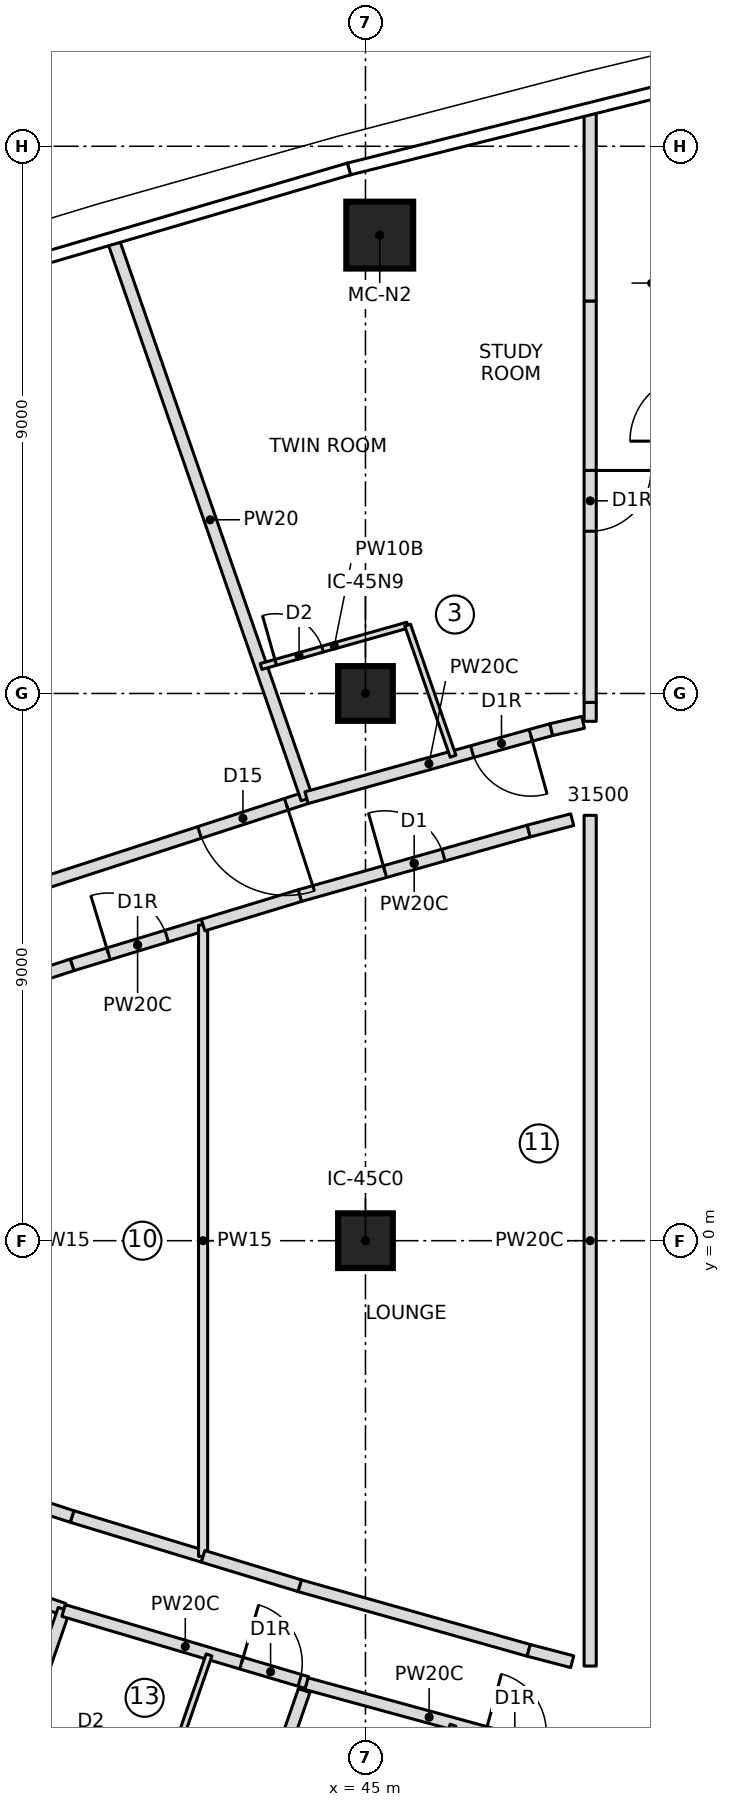
"""IFC4 building model, lengths in metres.
Left out: names, types, materials, properties, quantities, classifications, styles, units other than length and angle.
Written with IfcOpenShell. Run it as: python <this file> out.ifc"""

import sys

from ifc_helpers import new_model, si_unit, direction, frame, frame_2d, origin, origin_2d, place, context, subcontext, project, spatial, rectangle, extrude, element, fill, save


model = new_model("IFC4")
c1 = context("Model", 3, precision=1e-05, world=origin(), true_north=direction((0.0, 1.0)))
c2 = subcontext(c1, "Body", "Model", "MODEL_VIEW")
j1 = project(units=[si_unit("LENGTHUNIT", "METRE"), si_unit("PLANEANGLEUNIT", "RADIAN")], contexts=[c1])
p1 = place(None, origin())
s1 = spatial("IfcSite", under=j1, at=p1, CompositionType="ELEMENT")
p2 = place(p1, origin())
s2 = spatial("IfcBuilding", under=s1, at=p2, CompositionType="ELEMENT")
p3 = place(p2, frame((0.0, 0.0, 271.45)))
s3 = spatial("IfcBuildingStorey", under=s2, at=p3, CompositionType="ELEMENT", Elevation=271.45)
p4 = place(p3, frame((45.235, 16.539, 0.0), z_axis=(0.0, 0.0, 1.0), x_axis=(1.0, 0.0, 0.0)))
e1 = element("IfcColumn", 1, at=p4, inside=s3, PredefinedType="COLUMN", context=c2, shape_type="SweptSolid", body=[
    extrude(rectangle(XDim=1.1, YDim=1.1, at=origin_2d()), origin(), (0.0, 0.0, 1.0), 3.55),
])
for number, where, z_axis, x_axis in (
    (2, (45.0, 0.0, 0.0), (0.0, 0.0, 1.0), (1.0, 0.0, 0.0)),
    (3, (45.0, 9.0, 0.0), (0.0, 0.0, 1.0), (1.0, 0.0, 0.0)),
):
    element("IfcColumn", number, at=place(p3, frame(where, z_axis=z_axis, x_axis=x_axis)), inside=s3, PredefinedType="COLUMN", context=c2, shape_type="SweptSolid", body=[
        extrude(rectangle(XDim=0.9, YDim=0.9, at=origin_2d()), origin(), (0.0, 0.0, 1.0), 3.55),
    ])
p5 = place(p3, frame((44.031, 7.286, 0.0), z_axis=(0.0, 0.0, 1.0), x_axis=(-0.951130603276, -0.308788885019, 0.0)))
e4 = element("IfcWall", 4, at=p5, inside=s3, PredefinedType="PARTITIONING", context=c2, shape_type="SweptSolid", body=[
    extrude(rectangle(XDim=12.521, YDim=0.2, at=frame_2d((6.26, 0.0))), origin(), (0.0, 0.0, 1.0), 3.25),
])
p6 = place(p5, frame((0.35, 0.0, 0.0)))
e5 = element("IfcOpeningElement", 5, at=p6, cuts=e4, PredefinedType="OPENING", context=c2, shape_type="SweptSolid", body=[
    extrude(rectangle(XDim=1.5, YDim=2.1, at=frame_2d((0.75, 1.05))), frame((0.0, 0.11, 0.0), z_axis=(0.0, -1.0, 0.0), x_axis=(1.0, 0.0, 0.0)), (0.0, 0.0, 1.0), 0.22),
])
p7 = place(p3, frame((44.038, 7.267, 0.0), z_axis=(0.0, 0.0, 1.0), x_axis=(-0.327714576096, 0.944776776077, 0.0)))
e6 = element("IfcWall", 6, at=p7, inside=s3, PredefinedType="PARTITIONING", context=c2, shape_type="SweptSolid", body=[
    extrude(rectangle(XDim=9.717, YDim=0.2, at=frame_2d((4.858, 0.0))), origin(), (0.0, 0.0, 1.0), 3.25),
])
p8 = place(p3, frame((48.056, 8.405, 0.0), z_axis=(0.0, 0.0, 1.0), x_axis=(-0.963429942227, -0.267960344866, 0.0)))
e7 = element("IfcWall", 7, at=p8, inside=s3, PredefinedType="PARTITIONING", context=c2, shape_type="SweptSolid", body=[
    extrude(rectangle(XDim=4.177, YDim=0.2, at=frame_2d((2.089, 0.0))), origin(), (0.0, 0.0, 1.0), 3.25),
])
p9 = place(p8, frame((0.35, 0.0, 0.0)))
e8 = element("IfcOpeningElement", 8, at=p9, cuts=e7, PredefinedType="OPENING", context=c2, shape_type="SweptSolid", body=[
    extrude(rectangle(XDim=1.0, YDim=2.1, at=frame_2d((0.5, 1.05))), frame((0.0, 0.11, 0.0), z_axis=(0.0, -1.0, 0.0), x_axis=(1.0, 0.0, 0.0)), (0.0, 0.0, 1.0), 0.22),
])
p10 = place(p3, frame((43.283, 9.444, 0.0), z_axis=(0.0, 0.0, 1.0), x_axis=(0.962409173596, 0.271603723424, 0.0)))
e9 = element("IfcWall", 9, at=p10, inside=s3, PredefinedType="PARTITIONING", context=c2, shape_type="SweptSolid", body=[
    extrude(rectangle(XDim=2.504, YDim=0.1, at=frame_2d((1.252, 0.0))), origin(), (0.0, 0.0, 1.0), 3.25),
])
p11 = place(p10, frame((0.25, 0.0, 0.0)))
e10 = element("IfcOpeningElement", 10, at=p11, cuts=e9, PredefinedType="OPENING", context=c2, shape_type="SweptSolid", body=[
    extrude(rectangle(XDim=0.8, YDim=2.1, at=frame_2d((0.4, 1.05))), frame((0.0, 0.06, 0.0), z_axis=(0.0, -1.0, 0.0), x_axis=(1.0, 0.0, 0.0)), (0.0, 0.0, 1.0), 0.12),
])
p12 = place(p3, frame((45.693, 10.124, 0.0), z_axis=(0.0, 0.0, 1.0), x_axis=(0.327764902685, -0.944759317799, 0.0)))
e11 = element("IfcWall", 11, at=p12, inside=s3, PredefinedType="PARTITIONING", context=c2, shape_type="SweptSolid", body=[
    extrude(rectangle(XDim=2.281, YDim=0.1, at=frame_2d((1.14, 0.0))), origin(), (0.0, 0.0, 1.0), 3.25),
])
p13 = place(p3, frame((26.85, -1.423, 0.0), z_axis=(0.0, 0.0, 1.0), x_axis=(0.943328585164, -0.331860182022, 0.0)))
e12 = element("IfcWall", 12, at=p13, inside=s3, PredefinedType="PARTITIONING", context=c2, shape_type="SweptSolid", body=[
    extrude(rectangle(XDim=13.984, YDim=0.2, at=frame_2d((6.992, 0.0))), origin(), (0.0, 0.0, 1.0), 3.25),
])
p14 = place(p13, frame((3.05, 0.0, 0.0)))
e13 = element("IfcOpeningElement", 13, at=p14, cuts=e12, PredefinedType="OPENING", context=c2, shape_type="SweptSolid", body=[
    extrude(rectangle(XDim=1.5, YDim=2.1, at=frame_2d((0.75, 1.05))), frame((0.0, 0.11, 0.0), z_axis=(0.0, -1.0, 0.0), x_axis=(1.0, 0.0, 0.0)), (0.0, 0.0, 1.0), 0.22),
])
p15 = place(p3, frame((36.861, -15.235, 0.0), z_axis=(0.0, 0.0, 1.0), x_axis=(0.327710853631, 0.944778067279, 0.0)))
e14 = element("IfcWall", 14, at=p15, inside=s3, PredefinedType="PARTITIONING", context=c2, shape_type="SweptSolid", body=[
    extrude(rectangle(XDim=9.707, YDim=0.2, at=frame_2d((4.854, 0.0))), origin(), (0.0, 0.0, 1.0), 3.25),
])
p16 = place(p3, frame((40.035, -6.083, 0.0), z_axis=(0.0, 0.0, 1.0), x_axis=(0.958901312153, -0.283739799027, 0.0)))
e15 = element("IfcWall", 15, at=p16, inside=s3, PredefinedType="PARTITIONING", context=c2, shape_type="SweptSolid", body=[
    extrude(rectangle(XDim=4.174, YDim=0.2, at=frame_2d((2.087, 0.0))), origin(), (0.0, 0.0, 1.0), 3.25),
])
p17 = place(p16, frame((3.05, 0.0, 0.0)))
e16 = element("IfcOpeningElement", 16, at=p17, cuts=e15, PredefinedType="OPENING", context=c2, shape_type="SweptSolid", body=[
    extrude(rectangle(XDim=1.0, YDim=2.1, at=frame_2d((0.5, 1.05))), frame((0.0, 0.11, 0.0), z_axis=(0.0, -1.0, 0.0), x_axis=(1.0, 0.0, 0.0)), (0.0, 0.0, 1.0), 0.22),
])
p18 = place(p3, frame((42.428, -6.813, 0.0), z_axis=(0.0, 0.0, 1.0), x_axis=(-0.327743427431, -0.944766767925, 0.0)))
e17 = element("IfcWall", 17, at=p18, inside=s3, PredefinedType="PARTITIONING", context=c2, shape_type="SweptSolid", body=[
    extrude(rectangle(XDim=2.279, YDim=0.1, at=frame_2d((1.139, 0.0))), origin(), (0.0, 0.0, 1.0), 3.25),
])
p19 = place(p3, frame((40.854, -16.447, 0.0), z_axis=(0.0, 0.0, 1.0), x_axis=(0.327714654767, 0.944776748788, 0.0)))
e18 = element("IfcWall", 18, at=p19, inside=s3, PredefinedType="PARTITIONING", context=c2, shape_type="SweptSolid", body=[
    extrude(rectangle(XDim=9.577, YDim=0.2, at=frame_2d((4.788, 0.0))), origin(), (0.0, 0.0, 1.0), 3.25),
])
p20 = place(p3, frame((44.031, -7.286, 0.0), z_axis=(0.0, 0.0, 1.0), x_axis=(0.964708521199, -0.263320088726, 0.0)))
e19 = element("IfcWall", 19, at=p20, inside=s3, PredefinedType="PARTITIONING", context=c2, shape_type="SweptSolid", body=[
    extrude(rectangle(XDim=4.179, YDim=0.2, at=frame_2d((2.089, 0.0))), origin(), (0.0, 0.0, 1.0), 3.25),
])
p21 = place(p20, frame((3.05, 0.0, 0.0)))
e20 = element("IfcOpeningElement", 20, at=p21, cuts=e19, PredefinedType="OPENING", context=c2, shape_type="SweptSolid", body=[
    extrude(rectangle(XDim=1.0, YDim=2.1, at=frame_2d((0.5, 1.05))), frame((0.0, 0.11, 0.0), z_axis=(0.0, -1.0, 0.0), x_axis=(1.0, 0.0, 0.0)), (0.0, 0.0, 1.0), 0.22),
])
p22 = place(p3, frame((46.44, -7.969, 0.0), z_axis=(0.0, 0.0, 1.0), x_axis=(-0.327764902685, -0.944759317799, 0.0)))
e21 = element("IfcWall", 21, at=p22, inside=s3, PredefinedType="PARTITIONING", context=c2, shape_type="SweptSolid", body=[
    extrude(rectangle(XDim=2.281, YDim=0.1, at=frame_2d((1.14, 0.0))), origin(), (0.0, 0.0, 1.0), 3.25),
])
p23 = place(p3, frame((40.175, 4.536, 0.0), z_axis=(0.0, 0.0, 1.0), x_axis=(0.956739496331, 0.290945933396, 0.0)))
e22 = element("IfcWall", 22, at=p23, inside=s3, PredefinedType="PARTITIONING", context=c2, shape_type="SweptSolid", body=[
    extrude(rectangle(XDim=2.252, YDim=0.2, at=frame_2d((1.126, 0.0))), origin(), (0.0, 0.0, 1.0), 3.25),
])
p24 = place(p23, frame((0.626, 0.0, 0.0)))
e23 = element("IfcOpeningElement", 23, at=p24, cuts=e22, PredefinedType="OPENING", context=c2, shape_type="SweptSolid", body=[
    extrude(rectangle(XDim=1.0, YDim=2.1, at=frame_2d((0.5, 1.05))), frame((0.0, 0.11, 0.0), z_axis=(0.0, -1.0, 0.0), x_axis=(1.0, 0.0, 0.0)), (0.0, 0.0, 1.0), 0.22),
])
p25 = place(p3, frame((42.33, -5.191, 0.0), z_axis=(0.0, 0.0, 1.0), x_axis=(-0.956739496331, 0.290945933396, 0.0)))
e24 = element("IfcWall", 24, at=p25, inside=s3, PredefinedType="PARTITIONING", context=c2, shape_type="SweptSolid", body=[
    extrude(rectangle(XDim=2.252, YDim=0.2, at=frame_2d((1.126, 0.0))), origin(), (0.0, 0.0, 1.0), 3.25),
])
for number, where, z_axis, x_axis in (
    (25, (40.175, -4.536, 0.0), (0.0, 0.0, 1.0), (-0.951, 0.31, 0.0)),
    (26, (39.33, 4.26, 0.0), (0.0, 0.0, 1.0), (0.951, 0.31, 0.0)),
):
    element("IfcWall", number, at=place(p3, frame(where, z_axis=z_axis, x_axis=x_axis)), inside=s3, PredefinedType="PARTITIONING", context=c2, shape_type="SweptSolid", body=[
        extrude(rectangle(XDim=0.889, YDim=0.2, at=frame_2d((0.444, 0.0))), origin(), (0.0, 0.0, 1.0), 3.25),
    ])
p26 = place(p3, frame((42.33, -5.191, 0.0), z_axis=(0.0, 0.0, 1.0), x_axis=(0.0, 1.0, 0.0)))
e27 = element("IfcWall", 27, at=p26, inside=s3, PredefinedType="PARTITIONING", context=c2, shape_type="SweptSolid", body=[
    extrude(rectangle(XDim=10.383, YDim=0.15, at=frame_2d((5.191, 0.0))), origin(), (0.0, 0.0, 1.0), 3.25),
])
p27 = place(p3, frame((43.918, 5.675, 0.0), z_axis=(0.0, 0.0, 1.0), x_axis=(0.962411212211, 0.271596499628, 0.0)))
e28 = element("IfcWall", 28, at=p27, inside=s3, PredefinedType="PARTITIONING", context=c2, shape_type="SweptSolid", body=[
    extrude(rectangle(XDim=3.913, YDim=0.2, at=frame_2d((1.957, 0.0))), origin(), (0.0, 0.0, 1.0), 3.25),
])
p28 = place(p27, frame((1.457, 0.0, 0.0)))
e29 = element("IfcOpeningElement", 29, at=p28, cuts=e28, PredefinedType="OPENING", context=c2, shape_type="SweptSolid", body=[
    extrude(rectangle(XDim=1.0, YDim=2.1, at=frame_2d((0.5, 1.05))), frame((0.0, 0.11, 0.0), z_axis=(0.0, -1.0, 0.0), x_axis=(1.0, 0.0, 0.0)), (0.0, 0.0, 1.0), 0.22),
])
p29 = place(p3, frame((47.684, -6.738, 0.0), z_axis=(0.0, 0.0, 1.0), x_axis=(-0.962411212211, 0.271596499628, 0.0)))
e30 = element("IfcWall", 30, at=p29, inside=s3, PredefinedType="PARTITIONING", context=c2, shape_type="SweptSolid", body=[
    extrude(rectangle(XDim=3.913, YDim=0.2, at=frame_2d((1.957, 0.0))), origin(), (0.0, 0.0, 1.0), 3.25),
])
for number, where, z_axis, x_axis in (
    (31, (43.918, -5.675, 0.0), (0.0, 0.0, 1.0), (-0.957, 0.291, 0.0)),
    (32, (42.33, 5.191, 0.0), (0.0, 0.0, 1.0), (0.957, 0.291, 0.0)),
):
    element("IfcWall", number, at=place(p3, frame(where, z_axis=z_axis, x_axis=x_axis)), inside=s3, PredefinedType="PARTITIONING", context=c2, shape_type="SweptSolid", body=[
        extrude(rectangle(XDim=1.661, YDim=0.2, at=frame_2d((0.831, 0.0))), origin(), (0.0, 0.0, 1.0), 3.25),
    ])
for number, where, z_axis, x_axis in (
    (33, (47.684, 6.738, 0.0), (0.0, 0.0, 1.0), (0.968, 0.253, 0.0)),
    (34, (48.4, -6.924, 0.0), (0.0, 0.0, 1.0), (-0.968, 0.253, 0.0)),
):
    element("IfcWall", number, at=place(p3, frame(where, z_axis=z_axis, x_axis=x_axis)), inside=s3, PredefinedType="PARTITIONING", context=c2, shape_type="SweptSolid", body=[
        extrude(rectangle(XDim=0.74, YDim=0.2, at=frame_2d((0.37, 0.0))), origin(), (0.0, 0.0, 1.0), 3.25),
    ])
p30 = place(p3, frame((48.695, 15.455, 0.0), z_axis=(0.0, 0.0, 1.0), x_axis=(0.0, -1.0, 0.0)))
e35 = element("IfcWall", 35, at=p30, inside=s3, PredefinedType="PARTITIONING", context=c2, shape_type="SweptSolid", body=[
    extrude(rectangle(XDim=6.603, YDim=0.2, at=frame_2d((3.302, 0.0))), origin(), (0.0, 0.0, 1.0), 3.25),
])
p31 = place(p30, frame((2.787, 0.0, 0.0)))
e36 = element("IfcOpeningElement", 36, at=p31, cuts=e35, PredefinedType="OPENING", context=c2, shape_type="SweptSolid", body=[
    extrude(rectangle(XDim=1.0, YDim=2.1, at=frame_2d((0.5, 1.05))), frame((0.0, 0.11, 0.0), z_axis=(0.0, -1.0, 0.0), x_axis=(1.0, 0.0, 0.0)), (0.0, 0.0, 1.0), 0.22),
])
p32 = place(p3, frame((48.695, 6.996, 0.0), z_axis=(0.0, 0.0, 1.0), x_axis=(0.0, -1.0, 0.0)))
e37 = element("IfcWall", 37, at=p32, inside=s3, PredefinedType="PARTITIONING", context=c2, shape_type="SweptSolid", body=[
    extrude(rectangle(XDim=13.992, YDim=0.2, at=frame_2d((6.996, 0.0))), origin(), (0.0, 0.0, 1.0), 3.25),
])
p33 = place(p3, frame((48.695, 18.553, 0.0), z_axis=(0.0, 0.0, 1.0), x_axis=(0.0, -1.0, 0.0)))
e38 = element("IfcWall", 38, at=p33, inside=s3, PredefinedType="PARTITIONING", context=c2, shape_type="SweptSolid", body=[
    extrude(rectangle(XDim=3.098, YDim=0.2, at=frame_2d((1.549, 0.0))), origin(), (0.0, 0.0, 1.0), 3.25),
])
p34 = place(p3, frame((48.695, 8.852, 0.0), z_axis=(0.0, 0.0, 1.0), x_axis=(0.0, -1.0, 0.0)))
e39 = element("IfcWall", 39, at=p34, inside=s3, PredefinedType="PARTITIONING", context=c2, shape_type="SweptSolid", body=[
    extrude(rectangle(XDim=0.31, YDim=0.2, at=frame_2d((0.155, 0.0))), origin(), (0.0, 0.0, 1.0), 3.25),
])
p35 = place(p3, frame((48.579, 8.525, 0.0), z_axis=(0.0, 0.0, 1.0), x_axis=(-0.974742633665, -0.223331140051, 0.0)))
e40 = element("IfcWall", 40, at=p35, inside=s3, PredefinedType="PARTITIONING", context=c2, shape_type="SweptSolid", body=[
    extrude(rectangle(XDim=0.537, YDim=0.2, at=frame_2d((0.269, 0.0))), origin(), (0.0, 0.0, 1.0), 3.25),
])
p36 = place(p6, origin())
e41 = element("IfcDoor", 41, at=p36, inside=s3, OperationType="DOUBLE_DOOR_SINGLE_SWING", PredefinedType="DOOR", context=c2, shape_type="SweptSolid", body=[
    extrude(rectangle(XDim=1.5, YDim=2.1, at=frame_2d((0.75, 1.05))), frame((0.0, 0.025, 0.0), z_axis=(0.0, -1.0, 0.0), x_axis=(1.0, 0.0, 0.0)), (0.0, 0.0, 1.0), 0.05),
])
fill(e5, e41)
p37 = place(p11, origin())
e42 = element("IfcDoor", 42, at=p37, inside=s3, OperationType="SINGLE_SWING_LEFT", PredefinedType="DOOR", context=c2, shape_type="SweptSolid", body=[
    extrude(rectangle(XDim=0.8, YDim=2.1, at=frame_2d((0.4, 1.05))), frame((0.0, 0.025, 0.0), z_axis=(0.0, -1.0, 0.0), x_axis=(1.0, 0.0, 0.0)), (0.0, 0.0, 1.0), 0.05),
])
fill(e10, e42)
p38 = place(p9, origin())
e43 = element("IfcDoor", 43, at=p38, inside=s3, OperationType="SINGLE_SWING_RIGHT", PredefinedType="DOOR", context=c2, shape_type="SweptSolid", body=[
    extrude(rectangle(XDim=1.0, YDim=2.1, at=frame_2d((0.5, 1.05))), frame((0.0, 0.025, 0.0), z_axis=(0.0, -1.0, 0.0), x_axis=(1.0, 0.0, 0.0)), (0.0, 0.0, 1.0), 0.05),
])
fill(e8, e43)
p39 = place(p17, origin())
e44 = element("IfcDoor", 44, at=p39, inside=s3, OperationType="SINGLE_SWING_RIGHT", PredefinedType="DOOR", context=c2, shape_type="SweptSolid", body=[
    extrude(rectangle(XDim=1.0, YDim=2.1, at=frame_2d((0.5, 1.05))), frame((0.0, 0.025, 0.0), z_axis=(0.0, -1.0, 0.0), x_axis=(1.0, 0.0, 0.0)), (0.0, 0.0, 1.0), 0.05),
])
fill(e16, e44)
p40 = place(p24, origin())
e45 = element("IfcDoor", 45, at=p40, inside=s3, OperationType="SINGLE_SWING_RIGHT", PredefinedType="DOOR", context=c2, shape_type="SweptSolid", body=[
    extrude(rectangle(XDim=1.0, YDim=2.1, at=frame_2d((0.5, 1.05))), frame((0.0, 0.025, 0.0), z_axis=(0.0, -1.0, 0.0), x_axis=(1.0, 0.0, 0.0)), (0.0, 0.0, 1.0), 0.05),
])
fill(e23, e45)
p41 = place(p28, origin())
e46 = element("IfcDoor", 46, at=p41, inside=s3, OperationType="SINGLE_SWING_LEFT", PredefinedType="DOOR", context=c2, shape_type="SweptSolid", body=[
    extrude(rectangle(XDim=1.0, YDim=2.1, at=frame_2d((0.5, 1.05))), frame((0.0, 0.025, 0.0), z_axis=(0.0, -1.0, 0.0), x_axis=(1.0, 0.0, 0.0)), (0.0, 0.0, 1.0), 0.05),
])
fill(e29, e46)
p42 = place(p31, origin())
e47 = element("IfcDoor", 47, at=p42, inside=s3, OperationType="SINGLE_SWING_RIGHT", PredefinedType="DOOR", context=c2, shape_type="SweptSolid", body=[
    extrude(rectangle(XDim=1.0, YDim=2.1, at=frame_2d((0.5, 1.05))), frame((0.0, 0.025, 0.0), z_axis=(0.0, -1.0, 0.0), x_axis=(1.0, 0.0, 0.0)), (0.0, 0.0, 1.0), 0.05),
])
fill(e36, e47)
save(model, sys.argv[1])
